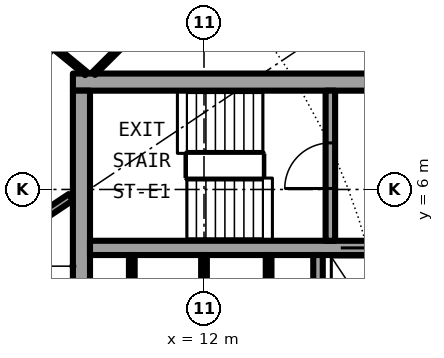
"""IFC4 building model, lengths in metres.
Left out: names, types, materials, properties, quantities, classifications, styles, units other than length and angle.
Written with IfcOpenShell. Run it as: python <this file> out.ifc"""

import sys

from ifc_helpers import new_model, si_unit, direction, frame, frame_2d, origin, place, context, subcontext, project, spatial, rectangle, extrude, element, fill, save


model = new_model("IFC4")
c1 = context("Model", 3, precision=1e-05, world=origin(), true_north=direction((0.0, 1.0)))
c2 = subcontext(c1, "Body", "Model", "MODEL_VIEW")
j1 = project(units=[si_unit("LENGTHUNIT", "METRE"), si_unit("PLANEANGLEUNIT", "RADIAN")], contexts=[c1])
p1 = place(None, origin())
s1 = spatial("IfcSite", under=j1, at=p1, CompositionType="ELEMENT")
p2 = place(p1, origin())
s2 = spatial("IfcBuilding", under=s1, at=p2, CompositionType="ELEMENT")
p3 = place(p2, frame((0.0, 0.0, 212.7)))
s3 = spatial("IfcBuildingStorey", under=s2, at=p3, CompositionType="ELEMENT", Elevation=212.7)
p4 = place(p3, frame((22.05, 8.825, 0.0), z_axis=(0.0, 0.0, 1.0), x_axis=(-1.0, 0.0, 0.0)))
e1 = element("IfcWall", 1, at=p4, inside=s3, PredefinedType="SHEAR", context=c2, shape_type="SweptSolid", body=[
    extrude(rectangle(XDim=13.5, YDim=0.45, at=frame_2d((6.75, 0.0))), origin(), (0.0, 0.0, 1.0), 3.05),
])
p5 = place(p4, frame((0.975, 0.0, 0.0)))
e2 = element("IfcOpeningElement", 2, at=p5, cuts=e1, PredefinedType="OPENING", context=c2, shape_type="SweptSolid", body=[
    extrude(rectangle(XDim=1.2, YDim=2.3, at=frame_2d((0.6, 1.15))), frame((0.0, 0.235, 0.0), z_axis=(0.0, -1.0, 0.0), x_axis=(1.0, 0.0, 0.0)), (0.0, 0.0, 1.0), 0.47),
])
p6 = place(p3, frame((8.775, -8.6, 0.0), z_axis=(0.0, 0.0, 1.0), x_axis=(0.0, 1.0, 0.0)))
e3 = element("IfcWall", 3, at=p6, inside=s3, PredefinedType="SHEAR", context=c2, shape_type="SweptSolid", body=[
    extrude(rectangle(XDim=17.2, YDim=0.45, at=frame_2d((8.6, 0.0))), origin(), (0.0, 0.0, 1.0), 3.05),
])
p7 = place(p6, frame((7.4, 0.0, 0.1)))
e4 = element("IfcOpeningElement", 4, at=p7, cuts=e3, PredefinedType="OPENING", context=c2, shape_type="SweptSolid", body=[
    extrude(rectangle(XDim=2.4, YDim=2.2, at=frame_2d((1.2, 1.1))), frame((0.0, 0.235, 0.0), z_axis=(0.0, -1.0, 0.0), x_axis=(1.0, 0.0, 0.0)), (0.0, 0.0, 1.0), 0.47),
])
p8 = place(p3, frame((9.0, 4.462, 0.0), z_axis=(0.0, 0.0, 1.0), x_axis=(1.0, 0.0, 0.0)))
e5 = element("IfcWall", 5, at=p8, inside=s3, PredefinedType="SHEAR", context=c2, shape_type="SweptSolid", body=[
    extrude(rectangle(XDim=10.15, YDim=0.375, at=frame_2d((5.075, 0.0))), origin(), (0.0, 0.0, 1.0), 3.05),
])
p9 = place(p8, frame((6.6, 0.0, 0.0)))
e6 = element("IfcOpeningElement", 6, at=p9, cuts=e5, PredefinedType="OPENING", context=c2, shape_type="SweptSolid", body=[
    extrude(rectangle(XDim=1.1, YDim=2.3, at=frame_2d((0.55, 1.15))), frame((0.0, 0.198, 0.0), z_axis=(0.0, -1.0, 0.0), x_axis=(1.0, 0.0, 0.0)), (0.0, 0.0, 1.0), 0.395),
])
p10 = place(p3, frame((15.325, 4.65, 0.0), z_axis=(0.0, 0.0, 1.0), x_axis=(0.0, 1.0, 0.0)))
e7 = element("IfcWall", 7, at=p10, inside=s3, PredefinedType="SHEAR", context=c2, shape_type="SweptSolid", body=[
    extrude(rectangle(XDim=3.95, YDim=0.25, at=frame_2d((1.975, 0.0))), origin(), (0.0, 0.0, 1.0), 3.05),
])
p11 = place(p10, frame((1.375, 0.0, 0.0)))
e8 = element("IfcOpeningElement", 8, at=p11, cuts=e7, PredefinedType="OPENING", context=c2, shape_type="SweptSolid", body=[
    extrude(rectangle(XDim=1.2, YDim=2.3, at=frame_2d((0.6, 1.15))), frame((0.0, 0.135, 0.0), z_axis=(0.0, -1.0, 0.0), x_axis=(1.0, 0.0, 0.0)), (0.0, 0.0, 1.0), 0.27),
])
p12 = place(p3, frame((15.0, 1.825, 0.0), z_axis=(0.0, 0.0, 1.0), x_axis=(0.0, 1.0, 0.0)))
e9 = element("IfcWall", 9, at=p12, inside=s3, PredefinedType="SOLIDWALL", context=c2, shape_type="SweptSolid", body=[
    extrude(rectangle(XDim=2.45, YDim=0.25, at=frame_2d((1.225, 0.0))), origin(), (0.0, 0.0, 1.0), 2.7),
])
for number, where, z_axis, x_axis in (
    (10, (10.1, 1.825, 0.0), (0.0, 0.0, 1.0), (0.0, 1.0, 0.0)),
    (11, (12.0, 1.825, 0.0), (0.0, 0.0, 1.0), (0.0, 1.0, 0.0)),
    (12, (13.7, 1.825, 0.0), (0.0, 0.0, 1.0), (0.0, 1.0, 0.0)),
):
    element("IfcWall", number, at=place(p3, frame(where, z_axis=z_axis, x_axis=x_axis)), inside=s3, PredefinedType="PARTITIONING", context=c2, shape_type="SweptSolid", body=[
        extrude(rectangle(XDim=2.45, YDim=0.15, at=frame_2d((1.225, 0.0))), origin(), (0.0, 0.0, 1.0), 2.7),
    ])
p13 = place(p3, frame((4.901, 5.966, 0.0), z_axis=(0.0, 0.0, 1.0), x_axis=(0.633851064378, 0.773455123577, 0.0)))
e13 = element("IfcWall", 13, at=p13, inside=s3, PredefinedType="PARTITIONING", context=c2, shape_type="SweptSolid", body=[
    extrude(rectangle(XDim=4.919, YDim=0.1, at=frame_2d((2.46, 0.0))), origin(), (0.0, 0.0, 1.0), 2.7),
])
p14 = place(p13, frame((2.009, 0.0, 0.0)))
e14 = element("IfcOpeningElement", 14, at=p14, cuts=e13, PredefinedType="OPENING", context=c2, shape_type="SweptSolid", body=[
    extrude(rectangle(XDim=0.9, YDim=2.3, at=frame_2d((0.45, 1.15))), frame((0.0, 0.06, 0.0), z_axis=(0.0, -1.0, 0.0), x_axis=(1.0, 0.0, 0.0)), (0.0, 0.0, 1.0), 0.12),
])
p15 = place(p3, frame((9.097, 9.05, 0.0), z_axis=(0.0, 0.0, 1.0), x_axis=(0.708909651863, 0.705299302067, 0.0)))
e15 = element("IfcWall", 15, at=p15, inside=s3, PredefinedType="PARTITIONING", context=c2, shape_type="SweptSolid", body=[
    extrude(rectangle(XDim=4.193, YDim=0.1, at=frame_2d((2.096, 0.0))), origin(), (0.0, 0.0, 1.0), 2.7),
])
p16 = place(p15, frame((1.646, 0.0, 0.0)))
e16 = element("IfcOpeningElement", 16, at=p16, cuts=e15, PredefinedType="OPENING", context=c2, shape_type="SweptSolid", body=[
    extrude(rectangle(XDim=0.9, YDim=2.3, at=frame_2d((0.45, 1.15))), frame((0.0, 0.06, 0.0), z_axis=(0.0, -1.0, 0.0), x_axis=(1.0, 0.0, 0.0)), (0.0, 0.0, 1.0), 0.12),
])
p17 = place(p3, frame((6.513, 4.472, 0.0), z_axis=(0.0, 0.0, 1.0), x_axis=(0.831403409976, 0.555669299026, 0.0)))
e17 = element("IfcWall", 17, at=p17, inside=s3, PredefinedType="PARTITIONING", context=c2, shape_type="SweptSolid", body=[
    extrude(rectangle(XDim=2.383, YDim=0.2, at=frame_2d((1.191, 0.0))), origin(), (0.0, 0.0, 1.0), 2.7),
])
p18 = place(p3, frame((8.019, 9.771, 0.0), z_axis=(0.0, 0.0, 1.0), x_axis=(0.772842270779, -0.63459815986, 0.0)))
e18 = element("IfcWall", 18, at=p18, inside=s3, PredefinedType="PARTITIONING", context=c2, shape_type="SweptSolid", body=[
    extrude(rectangle(XDim=1.143, YDim=0.1, at=frame_2d((0.571, 0.0))), origin(), (0.0, 0.0, 1.0), 2.7),
])
p19 = place(p9, origin())
e19 = element("IfcDoor", 19, at=p19, inside=s3, OperationType="DOUBLE_DOOR_SLIDING", PredefinedType="DOOR", context=c2, shape_type="SweptSolid", body=[
    extrude(rectangle(XDim=1.1, YDim=2.3, at=frame_2d((0.55, 1.15))), frame((0.0, 0.025, 0.0), z_axis=(0.0, -1.0, 0.0), x_axis=(1.0, 0.0, 0.0)), (0.0, 0.0, 1.0), 0.05),
])
fill(e6, e19)
p20 = place(p11, origin())
e20 = element("IfcDoor", 20, at=p20, inside=s3, OperationType="SINGLE_SWING_LEFT", PredefinedType="DOOR", context=c2, shape_type="SweptSolid", body=[
    extrude(rectangle(XDim=1.2, YDim=2.3, at=frame_2d((0.6, 1.15))), frame((0.0, 0.025, 0.0), z_axis=(0.0, -1.0, 0.0), x_axis=(1.0, 0.0, 0.0)), (0.0, 0.0, 1.0), 0.05),
])
fill(e8, e20)
save(model, sys.argv[1])
